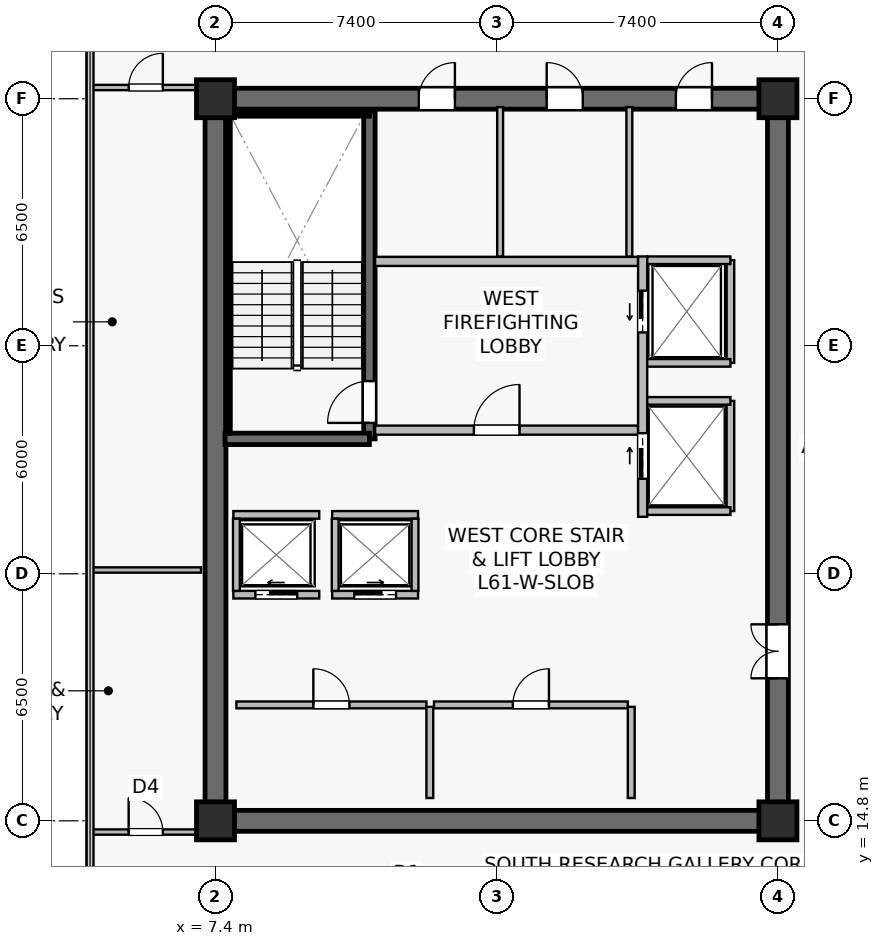
"""IFC4 building model, lengths in metres.
Left out: names, types, materials, properties, quantities, classifications, styles, units other than length and angle.
Written with IfcOpenShell. Run it as: python <this file> out.ifc"""

import sys

from ifc_helpers import new_model, si_unit, direction, frame, frame_2d, origin, origin_2d, place, context, subcontext, project, spatial, rectangle, extrude, source, transform, mapped, element, fill, save


model = new_model("IFC4")
c1 = context("Model", 3, precision=1e-05, world=origin(), true_north=direction((0.0, 1.0)))
c2 = subcontext(c1, "Body", "Model", "MODEL_VIEW")
j1 = project(units=[si_unit("LENGTHUNIT", "METRE"), si_unit("PLANEANGLEUNIT", "RADIAN")], contexts=[c1])
p1 = place(None, origin())
s1 = spatial("IfcSite", under=j1, at=p1, CompositionType="ELEMENT")
p2 = place(p1, origin())
s2 = spatial("IfcBuilding", under=s1, at=p2, CompositionType="ELEMENT")
p3 = place(p2, frame((0.0, 0.0, 254.7)))
s3 = spatial("IfcBuildingStorey", under=s2, at=p3, CompositionType="ELEMENT", Elevation=254.7)
p4 = place(p3, frame((7.125, 14.8, 0.0), z_axis=(0.0, 0.0, 1.0), x_axis=(1.0, 0.0, 0.0)))
e1 = element("IfcWall", 1, at=p4, inside=s3, PredefinedType="SHEAR", context=c2, shape_type="SweptSolid", body=[
    extrude(rectangle(XDim=15.35, YDim=0.55, at=frame_2d((7.675, 0.0))), origin(), (0.0, 0.0, 1.0), 3.8),
])
p5 = place(p3, frame((7.125, 33.8, 0.0), z_axis=(0.0, 0.0, 1.0), x_axis=(1.0, 0.0, 0.0)))
e2 = element("IfcWall", 2, at=p5, inside=s3, PredefinedType="SHEAR", context=c2, shape_type="SweptSolid", body=[
    extrude(rectangle(XDim=15.35, YDim=0.55, at=frame_2d((7.675, 0.0))), origin(), (0.0, 0.0, 1.0), 3.8),
])
p6 = place(p5, frame((5.625, 0.0, 0.0)))
e3 = element("IfcOpeningElement", 3, at=p6, cuts=e2, PredefinedType="OPENING", context=c2, shape_type="SweptSolid", body=[
    extrude(rectangle(XDim=0.95, YDim=2.15, at=frame_2d((0.475, 1.075))), frame((0.0, 0.285, 0.0), z_axis=(0.0, -1.0, 0.0), x_axis=(1.0, 0.0, 0.0)), (0.0, 0.0, 1.0), 0.57),
])
p7 = place(p5, frame((8.99, 0.0, 0.0)))
e4 = element("IfcOpeningElement", 4, at=p7, cuts=e2, PredefinedType="OPENING", context=c2, shape_type="SweptSolid", body=[
    extrude(rectangle(XDim=0.95, YDim=2.15, at=frame_2d((0.475, 1.075))), frame((0.0, 0.285, 0.0), z_axis=(0.0, -1.0, 0.0), x_axis=(1.0, 0.0, 0.0)), (0.0, 0.0, 1.0), 0.57),
])
p8 = place(p5, frame((12.39, 0.0, 0.0)))
e5 = element("IfcOpeningElement", 5, at=p8, cuts=e2, PredefinedType="OPENING", context=c2, shape_type="SweptSolid", body=[
    extrude(rectangle(XDim=0.95, YDim=2.15, at=frame_2d((0.475, 1.075))), frame((0.0, 0.285, 0.0), z_axis=(0.0, -1.0, 0.0), x_axis=(1.0, 0.0, 0.0)), (0.0, 0.0, 1.0), 0.57),
])
p9 = place(p3, frame((7.4, 15.075, 0.0), z_axis=(0.0, 0.0, 1.0), x_axis=(0.0, 1.0, 0.0)))
e6 = element("IfcWall", 6, at=p9, inside=s3, PredefinedType="SHEAR", context=c2, shape_type="SweptSolid", body=[
    extrude(rectangle(XDim=18.45, YDim=0.55, at=frame_2d((9.225, 0.0))), origin(), (0.0, 0.0, 1.0), 3.8),
])
p10 = place(p3, frame((22.2, 15.075, 0.0), z_axis=(0.0, 0.0, 1.0), x_axis=(0.0, 1.0, 0.0)))
e7 = element("IfcWall", 7, at=p10, inside=s3, PredefinedType="SHEAR", context=c2, shape_type="SweptSolid", body=[
    extrude(rectangle(XDim=18.45, YDim=0.55, at=frame_2d((9.225, 0.0))), origin(), (0.0, 0.0, 1.0), 3.8),
])
p11 = place(p10, frame((3.475, 0.0, 0.0)))
e8 = element("IfcOpeningElement", 8, at=p11, cuts=e7, PredefinedType="OPENING", context=c2, shape_type="SweptSolid", body=[
    extrude(rectangle(XDim=1.42, YDim=2.2, at=frame_2d((0.71, 1.1))), frame((0.0, 0.285, 0.0), z_axis=(0.0, -1.0, 0.0), x_axis=(1.0, 0.0, 0.0)), (0.0, 0.0, 1.0), 0.57),
])
p12 = place(p3, frame((11.45, 24.85, 0.0), z_axis=(0.0, 0.0, 1.0), x_axis=(0.0, 1.0, 0.0)))
e9 = element("IfcWall", 9, at=p12, inside=s3, PredefinedType="SHEAR", context=c2, shape_type="SweptSolid", body=[
    extrude(rectangle(XDim=8.63, YDim=0.3, at=frame_2d((4.315, 0.0))), origin(), (0.0, 0.0, 1.0), 3.8),
])
p13 = place(p12, frame((0.42, 0.0, 0.0)))
e10 = element("IfcOpeningElement", 10, at=p13, cuts=e9, PredefinedType="OPENING", context=c2, shape_type="SweptSolid", body=[
    extrude(rectangle(XDim=1.1, YDim=2.15, at=frame_2d((0.55, 1.075))), frame((0.0, 0.16, 0.0), z_axis=(0.0, -1.0, 0.0), x_axis=(1.0, 0.0, 0.0)), (0.0, 0.0, 1.0), 0.32),
])
p14 = place(p3, frame((7.65, 24.85, 0.0), z_axis=(0.0, 0.0, 1.0), x_axis=(1.0, 0.0, 0.0)))
e11 = element("IfcWall", 11, at=p14, inside=s3, PredefinedType="SHEAR", context=c2, shape_type="SweptSolid", body=[
    extrude(rectangle(XDim=3.8, YDim=0.3, at=frame_2d((1.9, 0.0))), origin(), (0.0, 0.0, 1.0), 3.8),
])
p15 = place(p3, frame((7.73, 33.4, 0.0), z_axis=(0.0, 0.0, 1.0), x_axis=(1.0, 0.0, 0.0)))
e12 = element("IfcWall", 12, at=p15, inside=s3, PredefinedType="SOLIDWALL", context=c2, shape_type="SweptSolid", body=[
    extrude(rectangle(XDim=3.72, YDim=0.12, at=frame_2d((1.86, 0.0))), origin(), (0.0, 0.0, 1.0), 3.8),
])
p16 = place(p3, frame((7.73, 25.0, 0.0), z_axis=(0.0, 0.0, 1.0), x_axis=(0.0, 1.0, 0.0)))
e13 = element("IfcWall", 13, at=p16, inside=s3, PredefinedType="SOLIDWALL", context=c2, shape_type="SweptSolid", body=[
    extrude(rectangle(XDim=8.32, YDim=0.12, at=frame_2d((4.16, 0.0))), origin(), (0.0, 0.0, 1.0), 3.8),
])
m1 = source(origin(), c2, "Body", "SweptSolid", [
    extrude(rectangle(XDim=1.0, YDim=1.0, at=origin_2d()), origin(), (0.0, 0.0, 1.0), 4.1),
])
for number, where, z_axis, x_axis in (
    (14, (7.4, 14.8, 0.0), (0.0, 0.0, 1.0), (1.0, 0.0, 0.0)),
    (15, (22.2, 14.8, 0.0), (0.0, 0.0, 1.0), (1.0, 0.0, 0.0)),
    (16, (7.4, 33.8, 0.0), (0.0, 0.0, 1.0), (1.0, 0.0, 0.0)),
    (17, (22.2, 33.8, 0.0), (0.0, 0.0, 1.0), (1.0, 0.0, 0.0)),
):
    element("IfcColumn", number, at=place(p3, frame(where, z_axis=z_axis, x_axis=x_axis)), inside=s3, PredefinedType="COLUMN", context=c2, shape_type="MappedRepresentation", body=[
        mapped(m1, transform((0.0, 0.0, 0.0), scale=1.0)),
    ])
p17 = place(p3, frame((11.6, 25.08, 0.0), z_axis=(0.0, 0.0, 1.0), x_axis=(1.0, 0.0, 0.0)))
e18 = element("IfcWall", 18, at=p17, inside=s3, PredefinedType="SOLIDWALL", context=c2, shape_type="SweptSolid", body=[
    extrude(rectangle(XDim=6.92, YDim=0.24, at=frame_2d((3.46, 0.0))), origin(), (0.0, 0.0, 1.0), 3.197),
])
p18 = place(p17, frame((2.6, 0.0, 0.0)))
e19 = element("IfcOpeningElement", 19, at=p18, cuts=e18, PredefinedType="OPENING", context=c2, shape_type="SweptSolid", body=[
    extrude(rectangle(XDim=1.2, YDim=2.16, at=frame_2d((0.6, 1.08))), frame((0.0, 0.13, 0.0), z_axis=(0.0, -1.0, 0.0), x_axis=(1.0, 0.0, 0.0)), (0.0, 0.0, 1.0), 0.26),
])
p19 = place(p3, frame((11.6, 29.52, 0.0), z_axis=(0.0, 0.0, 1.0), x_axis=(1.0, 0.0, 0.0)))
e20 = element("IfcWall", 20, at=p19, inside=s3, PredefinedType="SOLIDWALL", context=c2, shape_type="SweptSolid", body=[
    extrude(rectangle(XDim=6.92, YDim=0.24, at=frame_2d((3.46, 0.0))), origin(), (0.0, 0.0, 1.0), 3.197),
])
p20 = place(p3, frame((18.64, 22.8, 0.0), z_axis=(0.0, 0.0, 1.0), x_axis=(0.0, 1.0, 0.0)))
e21 = element("IfcWall", 21, at=p20, inside=s3, PredefinedType="SOLIDWALL", context=c2, shape_type="SweptSolid", body=[
    extrude(rectangle(XDim=6.85, YDim=0.24, at=frame_2d((3.425, 0.0))), origin(), (0.0, 0.0, 1.0), 2.935),
])
p21 = place(p20, frame((4.85, 0.0, 0.0)))
e22 = element("IfcOpeningElement", 22, at=p21, cuts=e21, PredefinedType="OPENING", context=c2, shape_type="SweptSolid", body=[
    extrude(rectangle(XDim=1.1, YDim=2.22, at=frame_2d((0.55, 1.11))), frame((0.0, 0.13, 0.0), z_axis=(0.0, -1.0, 0.0), x_axis=(1.0, 0.0, 0.0)), (0.0, 0.0, 1.0), 0.26),
])
p22 = place(p20, frame((1.0, 0.0, 0.0)))
e23 = element("IfcOpeningElement", 23, at=p22, cuts=e21, PredefinedType="OPENING", context=c2, shape_type="SweptSolid", body=[
    extrude(rectangle(XDim=1.2, YDim=2.22, at=frame_2d((0.6, 1.11))), frame((0.0, 0.13, 0.0), z_axis=(0.0, -1.0, 0.0), x_axis=(1.0, 0.0, 0.0)), (0.0, 0.0, 1.0), 0.26),
])
p23 = place(p3, frame((7.87, 20.75, 0.0), z_axis=(0.0, 0.0, 1.0), x_axis=(1.0, 0.0, 0.0)))
e24 = element("IfcWall", 24, at=p23, inside=s3, PredefinedType="SOLIDWALL", context=c2, shape_type="SweptSolid", body=[
    extrude(rectangle(XDim=2.26, YDim=0.2, at=frame_2d((1.13, 0.0))), origin(), (0.0, 0.0, 1.0), 3.8),
])
p24 = place(p23, frame((0.58, 0.0, 0.0)))
e25 = element("IfcOpeningElement", 25, at=p24, cuts=e24, PredefinedType="OPENING", context=c2, shape_type="SweptSolid", body=[
    extrude(rectangle(XDim=1.1, YDim=2.22, at=frame_2d((0.55, 1.11))), frame((0.0, 0.11, 0.0), z_axis=(0.0, -1.0, 0.0), x_axis=(1.0, 0.0, 0.0)), (0.0, 0.0, 1.0), 0.22),
])
p25 = place(p3, frame((7.87, 22.85, 0.0), z_axis=(0.0, 0.0, 1.0), x_axis=(1.0, 0.0, 0.0)))
e26 = element("IfcWall", 26, at=p25, inside=s3, PredefinedType="SOLIDWALL", context=c2, shape_type="SweptSolid", body=[
    extrude(rectangle(XDim=2.26, YDim=0.2, at=frame_2d((1.13, 0.0))), origin(), (0.0, 0.0, 1.0), 3.8),
])
p26 = place(p3, frame((7.95, 20.85, 0.0), z_axis=(0.0, 0.0, 1.0), x_axis=(0.0, 1.0, 0.0)))
e27 = element("IfcWall", 27, at=p26, inside=s3, PredefinedType="SOLIDWALL", context=c2, shape_type="SweptSolid", body=[
    extrude(rectangle(XDim=1.9, YDim=0.18, at=frame_2d((0.95, 0.0))), origin(), (0.0, 0.0, 1.0), 3.8),
])
p27 = place(p3, frame((10.47, 20.75, 0.0), z_axis=(0.0, 0.0, 1.0), x_axis=(1.0, 0.0, 0.0)))
e28 = element("IfcWall", 28, at=p27, inside=s3, PredefinedType="SOLIDWALL", context=c2, shape_type="SweptSolid", body=[
    extrude(rectangle(XDim=2.26, YDim=0.2, at=frame_2d((1.13, 0.0))), origin(), (0.0, 0.0, 1.0), 3.8),
])
p28 = place(p27, frame((0.58, 0.0, 0.0)))
e29 = element("IfcOpeningElement", 29, at=p28, cuts=e28, PredefinedType="OPENING", context=c2, shape_type="SweptSolid", body=[
    extrude(rectangle(XDim=1.1, YDim=2.22, at=frame_2d((0.55, 1.11))), frame((0.0, 0.11, 0.0), z_axis=(0.0, -1.0, 0.0), x_axis=(1.0, 0.0, 0.0)), (0.0, 0.0, 1.0), 0.22),
])
p29 = place(p3, frame((10.47, 22.85, 0.0), z_axis=(0.0, 0.0, 1.0), x_axis=(1.0, 0.0, 0.0)))
e30 = element("IfcWall", 30, at=p29, inside=s3, PredefinedType="SOLIDWALL", context=c2, shape_type="SweptSolid", body=[
    extrude(rectangle(XDim=2.26, YDim=0.2, at=frame_2d((1.13, 0.0))), origin(), (0.0, 0.0, 1.0), 3.8),
])
for number, where, z_axis, x_axis in (
    (31, (10.55, 20.85, 0.0), (0.0, 0.0, 1.0), (0.0, 1.0, 0.0)),
    (32, (12.65, 20.85, 0.0), (0.0, 0.0, 1.0), (0.0, 1.0, 0.0)),
):
    element("IfcWall", number, at=place(p3, frame(where, z_axis=z_axis, x_axis=x_axis)), inside=s3, PredefinedType="SOLIDWALL", context=c2, shape_type="SweptSolid", body=[
        extrude(rectangle(XDim=1.9, YDim=0.18, at=frame_2d((0.95, 0.0))), origin(), (0.0, 0.0, 1.0), 3.8),
    ])
p30 = place(p3, frame((20.95, 26.85, 0.0), z_axis=(0.0, 0.0, 1.0), x_axis=(0.0, 1.0, 0.0)))
e33 = element("IfcWall", 33, at=p30, inside=s3, PredefinedType="SOLIDWALL", context=c2, shape_type="SweptSolid", body=[
    extrude(rectangle(XDim=2.7, YDim=0.2, at=frame_2d((1.35, 0.0))), origin(), (0.0, 0.0, 1.0), 3.8),
])
p31 = place(p3, frame((18.76, 29.55, 0.0), z_axis=(0.0, 0.0, 1.0), x_axis=(1.0, 0.0, 0.0)))
e34 = element("IfcWall", 34, at=p31, inside=s3, PredefinedType="SOLIDWALL", context=c2, shape_type="SweptSolid", body=[
    extrude(rectangle(XDim=2.19, YDim=0.2, at=frame_2d((1.095, 0.0))), origin(), (0.0, 0.0, 1.0), 3.8),
])
p32 = place(p3, frame((18.76, 26.85, 0.0), z_axis=(0.0, 0.0, 1.0), x_axis=(1.0, 0.0, 0.0)))
e35 = element("IfcWall", 35, at=p32, inside=s3, PredefinedType="SOLIDWALL", context=c2, shape_type="SweptSolid", body=[
    extrude(rectangle(XDim=2.19, YDim=0.2, at=frame_2d((1.095, 0.0))), origin(), (0.0, 0.0, 1.0), 3.197),
])
p33 = place(p3, frame((20.95, 22.95, 0.0), z_axis=(0.0, 0.0, 1.0), x_axis=(0.0, 1.0, 0.0)))
e36 = element("IfcWall", 36, at=p33, inside=s3, PredefinedType="SOLIDWALL", context=c2, shape_type="SweptSolid", body=[
    extrude(rectangle(XDim=2.9, YDim=0.2, at=frame_2d((1.45, 0.0))), origin(), (0.0, 0.0, 1.0), 2.935),
])
for number, where, z_axis, x_axis in (
    (37, (18.76, 25.85, 0.0), (0.0, 0.0, 1.0), (1.0, 0.0, 0.0)),
    (38, (18.76, 22.95, 0.0), (0.0, 0.0, 1.0), (1.0, 0.0, 0.0)),
):
    element("IfcWall", number, at=place(p3, frame(where, z_axis=z_axis, x_axis=x_axis)), inside=s3, PredefinedType="SOLIDWALL", context=c2, shape_type="SweptSolid", body=[
        extrude(rectangle(XDim=2.19, YDim=0.2, at=frame_2d((1.095, 0.0))), origin(), (0.0, 0.0, 1.0), 3.8),
    ])
p34 = place(p3, frame((7.95, 17.85, 0.0), z_axis=(0.0, 0.0, 1.0), x_axis=(1.0, 0.0, 0.0)))
e39 = element("IfcWall", 39, at=p34, inside=s3, PredefinedType="SOLIDWALL", context=c2, shape_type="SweptSolid", body=[
    extrude(rectangle(XDim=5.0, YDim=0.18, at=frame_2d((2.5, 0.0))), origin(), (0.0, 0.0, 1.0), 3.8),
])
p35 = place(p34, frame((2.025, 0.0, 0.0)))
e40 = element("IfcOpeningElement", 40, at=p35, cuts=e39, PredefinedType="OPENING", context=c2, shape_type="SweptSolid", body=[
    extrude(rectangle(XDim=0.95, YDim=2.15, at=frame_2d((0.475, 1.075))), frame((0.0, 0.1, 0.0), z_axis=(0.0, -1.0, 0.0), x_axis=(1.0, 0.0, 0.0)), (0.0, 0.0, 1.0), 0.2),
])
p36 = place(p3, frame((13.04, 15.4, 0.0), z_axis=(0.0, 0.0, 1.0), x_axis=(0.0, 1.0, 0.0)))
e41 = element("IfcWall", 41, at=p36, inside=s3, PredefinedType="SOLIDWALL", context=c2, shape_type="SweptSolid", body=[
    extrude(rectangle(XDim=2.4, YDim=0.18, at=frame_2d((1.2, 0.0))), origin(), (0.0, 0.0, 1.0), 3.8),
])
p37 = place(p3, frame((13.15, 17.85, 0.0), z_axis=(0.0, 0.0, 1.0), x_axis=(1.0, 0.0, 0.0)))
e42 = element("IfcWall", 42, at=p37, inside=s3, PredefinedType="SOLIDWALL", context=c2, shape_type="SweptSolid", body=[
    extrude(rectangle(XDim=5.1, YDim=0.18, at=frame_2d((2.55, 0.0))), origin(), (0.0, 0.0, 1.0), 3.197),
])
p38 = place(p37, frame((2.075, 0.0, 0.0)))
e43 = element("IfcOpeningElement", 43, at=p38, cuts=e42, PredefinedType="OPENING", context=c2, shape_type="SweptSolid", body=[
    extrude(rectangle(XDim=0.95, YDim=2.15, at=frame_2d((0.475, 1.075))), frame((0.0, 0.1, 0.0), z_axis=(0.0, -1.0, 0.0), x_axis=(1.0, 0.0, 0.0)), (0.0, 0.0, 1.0), 0.2),
])
p39 = place(p3, frame((18.34, 15.4, 0.0), z_axis=(0.0, 0.0, 1.0), x_axis=(0.0, 1.0, 0.0)))
e44 = element("IfcWall", 44, at=p39, inside=s3, PredefinedType="SOLIDWALL", context=c2, shape_type="SweptSolid", body=[
    extrude(rectangle(XDim=2.4, YDim=0.18, at=frame_2d((1.2, 0.0))), origin(), (0.0, 0.0, 1.0), 3.8),
])
p40 = place(p3, frame((14.89, 29.65, 0.0), z_axis=(0.0, 0.0, 1.0), x_axis=(0.0, 1.0, 0.0)))
e45 = element("IfcWall", 45, at=p40, inside=s3, PredefinedType="PLUMBINGWALL", context=c2, shape_type="SweptSolid", body=[
    extrude(rectangle(XDim=3.93, YDim=0.155, at=frame_2d((1.965, 0.0))), origin(), (0.0, 0.0, 1.0), 3.197),
])
p41 = place(p3, frame((18.29, 29.65, 0.0), z_axis=(0.0, 0.0, 1.0), x_axis=(0.0, 1.0, 0.0)))
e46 = element("IfcWall", 46, at=p41, inside=s3, PredefinedType="PLUMBINGWALL", context=c2, shape_type="SweptSolid", body=[
    extrude(rectangle(XDim=3.93, YDim=0.155, at=frame_2d((1.965, 0.0))), origin(), (0.0, 0.0, 1.0), 3.8),
])
p42 = place(p3, frame((4.11, 21.4, 0.0), z_axis=(0.0, 0.0, 1.0), x_axis=(1.0, 0.0, 0.0)))
e47 = element("IfcWall", 47, at=p42, inside=s3, PredefinedType="PARTITIONING", context=c2, shape_type="SweptSolid", body=[
    extrude(rectangle(XDim=2.91, YDim=0.14, at=frame_2d((1.455, 0.0))), origin(), (0.0, 0.0, 1.0), 3.8),
])
p43 = place(p3, frame((4.11, 14.505, 0.0), z_axis=(0.0, 0.0, 1.0), x_axis=(1.0, 0.0, 0.0)))
e48 = element("IfcWall", 48, at=p43, inside=s3, PredefinedType="PARTITIONING", context=c2, shape_type="SweptSolid", body=[
    extrude(rectangle(XDim=2.91, YDim=0.14, at=frame_2d((1.455, 0.0))), origin(), (0.0, 0.0, 1.0), 3.8),
])
p44 = place(p43, frame((1.005, 0.0, 0.0)))
e49 = element("IfcOpeningElement", 49, at=p44, cuts=e48, PredefinedType="OPENING", context=c2, shape_type="SweptSolid", body=[
    extrude(rectangle(XDim=0.9, YDim=2.1, at=frame_2d((0.45, 1.05))), frame((0.0, 0.08, 0.0), z_axis=(0.0, -1.0, 0.0), x_axis=(1.0, 0.0, 0.0)), (0.0, 0.0, 1.0), 0.16),
])
p45 = place(p3, frame((4.11, 34.095, 0.0), z_axis=(0.0, 0.0, 1.0), x_axis=(1.0, 0.0, 0.0)))
e50 = element("IfcWall", 50, at=p45, inside=s3, PredefinedType="PARTITIONING", context=c2, shape_type="SweptSolid", body=[
    extrude(rectangle(XDim=2.91, YDim=0.14, at=frame_2d((1.455, 0.0))), origin(), (0.0, 0.0, 1.0), 3.8),
])
p46 = place(p45, frame((1.005, 0.0, 0.0)))
e51 = element("IfcOpeningElement", 51, at=p46, cuts=e50, PredefinedType="OPENING", context=c2, shape_type="SweptSolid", body=[
    extrude(rectangle(XDim=0.9, YDim=2.1, at=frame_2d((0.45, 1.05))), frame((0.0, 0.08, 0.0), z_axis=(0.0, -1.0, 0.0), x_axis=(1.0, 0.0, 0.0)), (0.0, 0.0, 1.0), 0.16),
])
m2 = source(origin(), c2, "Body", "SweptSolid", [
    extrude(rectangle(XDim=1.1, YDim=2.15, at=frame_2d((0.55, 1.075))), frame((0.0, 0.025, 0.0), z_axis=(0.0, -1.0, 0.0), x_axis=(1.0, 0.0, 0.0)), (0.0, 0.0, 1.0), 0.05),
])
p47 = place(p13, origin())
e52 = element("IfcDoor", 52, at=p47, inside=s3, OperationType="SINGLE_SWING_LEFT", PredefinedType="DOOR", context=c2, shape_type="MappedRepresentation", body=[
    mapped(m2, transform((0.0, 0.0, 0.0), scale=1.0)),
])
fill(e10, e52)
m3 = source(origin(), c2, "Body", "SweptSolid", [
    extrude(rectangle(XDim=1.2, YDim=2.16, at=frame_2d((0.6, 1.08))), frame((0.0, 0.025, 0.0), z_axis=(0.0, -1.0, 0.0), x_axis=(1.0, 0.0, 0.0)), (0.0, 0.0, 1.0), 0.05),
])
p48 = place(p18, origin())
e53 = element("IfcDoor", 53, at=p48, inside=s3, OperationType="SINGLE_SWING_RIGHT", PredefinedType="DOOR", context=c2, shape_type="MappedRepresentation", body=[
    mapped(m3, transform((0.0, 0.0, 0.0), scale=1.0)),
])
fill(e19, e53)
m4 = source(origin(), c2, "Body", "SweptSolid", [
    extrude(rectangle(XDim=1.1, YDim=2.22, at=frame_2d((0.55, 1.11))), frame((0.0, 0.025, 0.0), z_axis=(0.0, -1.0, 0.0), x_axis=(1.0, 0.0, 0.0)), (0.0, 0.0, 1.0), 0.05),
])
p49 = place(p24, origin())
e54 = element("IfcDoor", 54, at=p49, inside=s3, OperationType="SLIDING_TO_LEFT", PredefinedType="USERDEFINED", context=c2, shape_type="MappedRepresentation", body=[
    mapped(m4, transform((0.0, 0.0, 0.0), scale=1.0)),
])
fill(e25, e54)
p50 = place(p28, origin())
e55 = element("IfcDoor", 55, at=p50, inside=s3, OperationType="SLIDING_TO_RIGHT", PredefinedType="USERDEFINED", context=c2, shape_type="MappedRepresentation", body=[
    mapped(m4, transform((0.0, 0.0, 0.0), scale=1.0)),
])
fill(e29, e55)
p51 = place(p21, origin())
e56 = element("IfcDoor", 56, at=p51, inside=s3, OperationType="SLIDING_TO_LEFT", PredefinedType="USERDEFINED", context=c2, shape_type="MappedRepresentation", body=[
    mapped(m4, transform((0.0, 0.0, 0.0), scale=1.0)),
])
fill(e22, e56)
m5 = source(origin(), c2, "Body", "SweptSolid", [
    extrude(rectangle(XDim=1.2, YDim=2.22, at=frame_2d((0.6, 1.11))), frame((0.0, 0.025, 0.0), z_axis=(0.0, -1.0, 0.0), x_axis=(1.0, 0.0, 0.0)), (0.0, 0.0, 1.0), 0.05),
])
p52 = place(p22, origin())
e57 = element("IfcDoor", 57, at=p52, inside=s3, OperationType="SLIDING_TO_RIGHT", PredefinedType="USERDEFINED", context=c2, shape_type="MappedRepresentation", body=[
    mapped(m5, transform((0.0, 0.0, 0.0), scale=1.0)),
])
fill(e23, e57)
m6 = source(origin(), c2, "Body", "SweptSolid", [
    extrude(rectangle(XDim=0.95, YDim=2.15, at=frame_2d((0.475, 1.075))), frame((0.0, 0.025, 0.0), z_axis=(0.0, -1.0, 0.0), x_axis=(1.0, 0.0, 0.0)), (0.0, 0.0, 1.0), 0.05),
])
p53 = place(p35, origin())
e58 = element("IfcDoor", 58, at=p53, inside=s3, OperationType="SINGLE_SWING_LEFT", PredefinedType="DOOR", context=c2, shape_type="MappedRepresentation", body=[
    mapped(m6, transform((0.0, 0.0, 0.0), scale=1.0)),
])
fill(e40, e58)
p54 = place(p38, origin())
e59 = element("IfcDoor", 59, at=p54, inside=s3, OperationType="SINGLE_SWING_RIGHT", PredefinedType="DOOR", context=c2, shape_type="MappedRepresentation", body=[
    mapped(m6, transform((0.0, 0.0, 0.0), scale=1.0)),
])
fill(e43, e59)
m7 = source(origin(), c2, "Body", "SweptSolid", [
    extrude(rectangle(XDim=1.42, YDim=2.2, at=frame_2d((0.71, 1.1))), frame((0.0, 0.025, 0.0), z_axis=(0.0, -1.0, 0.0), x_axis=(1.0, 0.0, 0.0)), (0.0, 0.0, 1.0), 0.05),
])
p55 = place(p11, origin())
e60 = element("IfcDoor", 60, at=p55, inside=s3, OperationType="DOUBLE_DOOR_SINGLE_SWING", PredefinedType="DOOR", context=c2, shape_type="MappedRepresentation", body=[
    mapped(m7, transform((0.0, 0.0, 0.0), scale=1.0)),
])
fill(e8, e60)
p56 = place(p6, origin())
e61 = element("IfcDoor", 61, at=p56, inside=s3, OperationType="SINGLE_SWING_RIGHT", PredefinedType="DOOR", context=c2, shape_type="MappedRepresentation", body=[
    mapped(m6, transform((0.0, 0.0, 0.0), scale=1.0)),
])
fill(e3, e61)
p57 = place(p7, origin())
e62 = element("IfcDoor", 62, at=p57, inside=s3, OperationType="SINGLE_SWING_LEFT", PredefinedType="DOOR", context=c2, shape_type="MappedRepresentation", body=[
    mapped(m6, transform((0.0, 0.0, 0.0), scale=1.0)),
])
fill(e4, e62)
p58 = place(p8, origin())
e63 = element("IfcDoor", 63, at=p58, inside=s3, OperationType="SINGLE_SWING_RIGHT", PredefinedType="DOOR", context=c2, shape_type="MappedRepresentation", body=[
    mapped(m6, transform((0.0, 0.0, 0.0), scale=1.0)),
])
fill(e5, e63)
m8 = source(origin(), c2, "Body", "SweptSolid", [
    extrude(rectangle(XDim=0.9, YDim=2.1, at=frame_2d((0.45, 1.05))), frame((0.0, 0.025, 0.0), z_axis=(0.0, -1.0, 0.0), x_axis=(1.0, 0.0, 0.0)), (0.0, 0.0, 1.0), 0.05),
])
p59 = place(p44, origin())
e64 = element("IfcDoor", 64, at=p59, inside=s3, OperationType="SINGLE_SWING_LEFT", PredefinedType="DOOR", context=c2, shape_type="MappedRepresentation", body=[
    mapped(m8, transform((0.0, 0.0, 0.0), scale=1.0)),
])
fill(e49, e64)
p60 = place(p46, origin())
e65 = element("IfcDoor", 65, at=p60, inside=s3, OperationType="SINGLE_SWING_RIGHT", PredefinedType="DOOR", context=c2, shape_type="MappedRepresentation", body=[
    mapped(m8, transform((0.0, 0.0, 0.0), scale=1.0)),
])
fill(e51, e65)
save(model, sys.argv[1])
